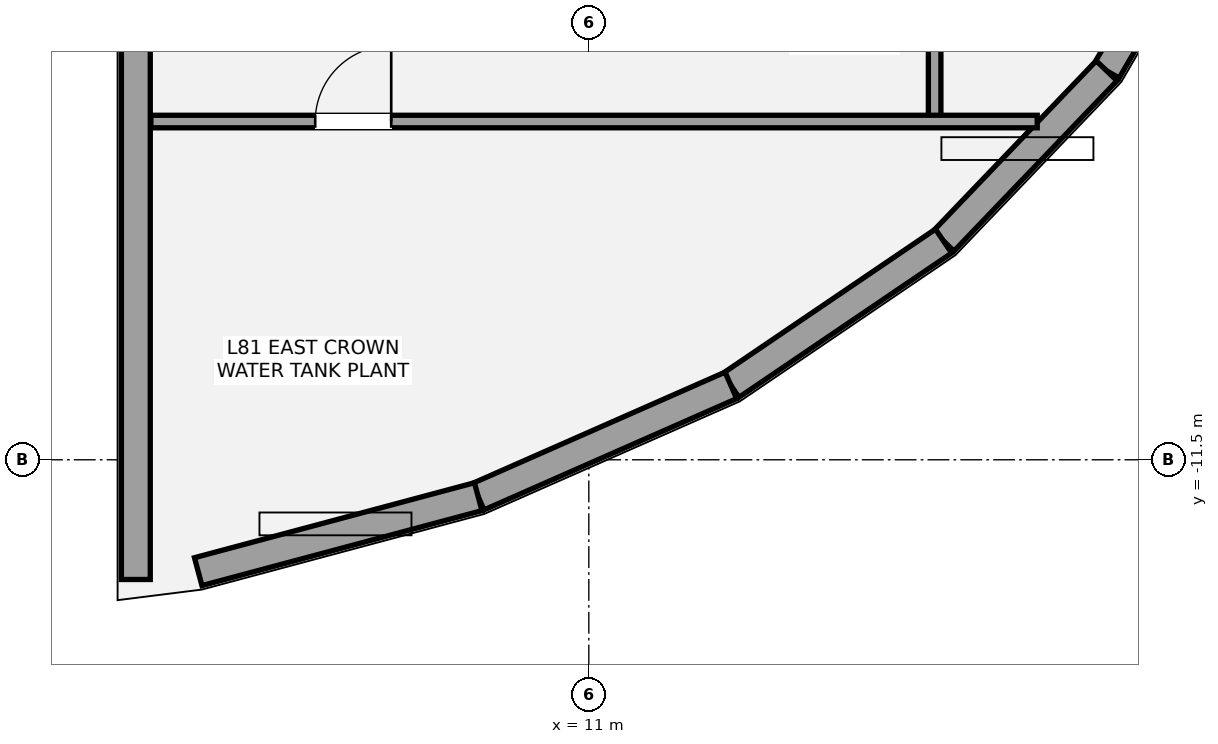
"""IFC4 building model, lengths in metres.
Left out: names, types, materials, properties, quantities, classifications, styles, units other than length and angle.
Written with IfcOpenShell. Run it as: python <this file> out.ifc"""

import sys

from ifc_helpers import new_model, si_unit, direction, frame, frame_2d, origin, place, context, subcontext, project, spatial, rectangle, extrude, element, fill, save


model = new_model("IFC4")
c1 = context("Model", 3, precision=1e-05, world=origin(), true_north=direction((0.0, 1.0)))
c2 = subcontext(c1, "Body", "Model", "MODEL_VIEW")
j1 = project(units=[si_unit("LENGTHUNIT", "METRE"), si_unit("PLANEANGLEUNIT", "RADIAN")], contexts=[c1])
p1 = place(None, origin())
s1 = spatial("IfcSite", under=j1, at=p1, CompositionType="ELEMENT")
p2 = place(p1, origin())
s2 = spatial("IfcBuilding", under=s1, at=p2, CompositionType="ELEMENT")
p3 = place(p2, frame((0.0, 0.0, 288.2)))
s3 = spatial("IfcBuildingStorey", under=s2, at=p3, CompositionType="ELEMENT", Elevation=288.2)
p4 = place(p3, frame((17.813, -6.382, 0.0), z_axis=(0.0, 0.0, 1.0), x_axis=(0.503052590922, 0.864255801697, 0.0)))
e1 = element("IfcWall", 1, at=p4, inside=s3, PredefinedType="ELEMENTEDWALL", context=c2, shape_type="SweptSolid", body=[
    extrude(rectangle(XDim=2.857, YDim=0.38, at=frame_2d((1.429, 0.0))), origin(), (0.0, 0.0, 1.0), 3.02),
])
p5 = place(p3, frame((15.667, -8.623, 0.0), z_axis=(0.0, 0.0, 1.0), x_axis=(0.691554901652, 0.722323901031, 0.0)))
e2 = element("IfcWall", 2, at=p5, inside=s3, PredefinedType="ELEMENTEDWALL", context=c2, shape_type="SweptSolid", body=[
    extrude(rectangle(XDim=3.103, YDim=0.38, at=frame_2d((1.551, 0.0))), origin(), (0.0, 0.0, 1.0), 3.02),
])
p6 = place(p3, frame((12.869, -10.521, 0.0), z_axis=(0.0, 0.0, 1.0), x_axis=(0.827602756671, 0.561314241001, 0.0)))
e3 = element("IfcWall", 3, at=p6, inside=s3, PredefinedType="ELEMENTEDWALL", context=c2, shape_type="SweptSolid", body=[
    extrude(rectangle(XDim=3.381, YDim=0.38, at=frame_2d((1.691, 0.0))), origin(), (0.0, 0.0, 1.0), 3.02),
])
p7 = place(p3, frame((9.545, -11.986, 0.0), z_axis=(0.0, 0.0, 1.0), x_axis=(0.915153428526, 0.403105696137, 0.0)))
e4 = element("IfcWall", 4, at=p7, inside=s3, PredefinedType="ELEMENTEDWALL", context=c2, shape_type="SweptSolid", body=[
    extrude(rectangle(XDim=3.633, YDim=0.38, at=frame_2d((1.816, 0.0))), origin(), (0.0, 0.0, 1.0), 3.02),
])
p8 = place(p3, frame((5.861, -12.972, 0.0), z_axis=(0.0, 0.0, 1.0), x_axis=(0.965986900467, 0.2585910055, 0.0)))
e5 = element("IfcWall", 5, at=p8, inside=s3, PredefinedType="ELEMENTEDWALL", context=c2, shape_type="SweptSolid", body=[
    extrude(rectangle(XDim=3.813, YDim=0.38, at=frame_2d((1.907, 0.0))), origin(), (0.0, 0.0, 1.0), 3.02),
])
p9 = place(p3, frame((5.04, 1.22, 0.0), z_axis=(0.0, 0.0, 1.0), x_axis=(0.0, -1.0, 0.0)))
e6 = element("IfcWall", 6, at=p9, inside=s3, PredefinedType="ELEMENTEDWALL", context=c2, shape_type="SweptSolid", body=[
    extrude(rectangle(XDim=14.295, YDim=0.38, at=frame_2d((7.147, 0.0))), origin(), (0.0, 0.0, 1.0), 3.02),
])
p10 = place(p3, frame((15.55, -7.05, 0.0), z_axis=(0.0, 0.0, 1.0), x_axis=(0.0, 1.0, 0.0)))
e7 = element("IfcWall", 7, at=p10, inside=s3, PredefinedType="PARTITIONING", context=c2, shape_type="SweptSolid", body=[
    extrude(rectangle(XDim=14.7, YDim=0.165, at=frame_2d((7.35, 0.0))), origin(), (0.0, 0.0, 1.0), 3.037),
])
p11 = place(p10, frame((5.78, 0.0, 0.0)))
e8 = element("IfcOpeningElement", 8, at=p11, cuts=e7, PredefinedType="OPENING", context=c2, shape_type="SweptSolid", body=[
    extrude(rectangle(XDim=1.0, YDim=2.15, at=frame_2d((0.5, 1.075))), frame((0.0, 0.093, 0.0), z_axis=(0.0, -1.0, 0.0), x_axis=(1.0, 0.0, 0.0)), (0.0, 0.0, 1.0), 0.185),
])
p12 = place(p3, frame((5.238, -7.05, 0.0), z_axis=(0.0, 0.0, 1.0), x_axis=(1.0, 0.0, 0.0)))
e9 = element("IfcWall", 9, at=p12, inside=s3, PredefinedType="PARTITIONING", context=c2, shape_type="SweptSolid", body=[
    extrude(rectangle(XDim=11.662, YDim=0.165, at=frame_2d((5.831, 0.0))), origin(), (0.0, 0.0, 1.0), 3.018),
])
p13 = place(p12, frame((2.162, 0.0, 0.0)))
e10 = element("IfcOpeningElement", 10, at=p13, cuts=e9, PredefinedType="OPENING", context=c2, shape_type="SweptSolid", body=[
    extrude(rectangle(XDim=1.0, YDim=2.15, at=frame_2d((0.5, 1.075))), frame((0.0, 0.093, 0.0), z_axis=(0.0, -1.0, 0.0), x_axis=(1.0, 0.0, 0.0)), (0.0, 0.0, 1.0), 0.185),
])
p14 = place(p13, origin())
e11 = element("IfcDoor", 11, at=p14, inside=s3, OperationType="SINGLE_SWING_RIGHT", PredefinedType="DOOR", context=c2, shape_type="SweptSolid", body=[
    extrude(rectangle(XDim=1.0, YDim=2.15, at=frame_2d((0.5, 1.075))), frame((0.0, 0.025, 0.0), z_axis=(0.0, -1.0, 0.0), x_axis=(1.0, 0.0, 0.0)), (0.0, 0.0, 1.0), 0.05),
])
fill(e10, e11)
save(model, sys.argv[1])
